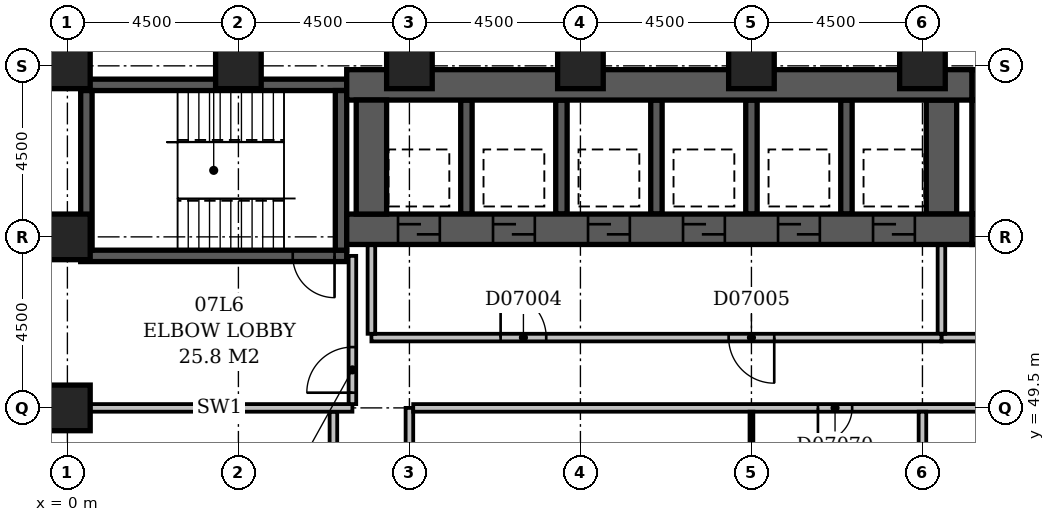
"""IFC4 building model, lengths in metres.
Left out: names, types, materials, properties, quantities, classifications, styles, units other than length and angle.
Written with IfcOpenShell. Run it as: python <this file> out.ifc"""

import sys

from ifc_helpers import new_model, si_unit, direction, frame, frame_2d, origin, origin_2d, place, context, subcontext, project, spatial, rectangle, extrude, element, fill, save


model = new_model("IFC4")
c1 = context("Model", 3, precision=1e-05, world=origin(), true_north=direction((0.0, 1.0)))
c2 = subcontext(c1, "Body", "Model", "MODEL_VIEW")
j1 = project(units=[si_unit("LENGTHUNIT", "METRE"), si_unit("PLANEANGLEUNIT", "RADIAN")], contexts=[c1])
p1 = place(None, origin())
s1 = spatial("IfcSite", under=j1, at=p1, CompositionType="ELEMENT")
p2 = place(p1, origin())
s2 = spatial("IfcBuilding", under=s1, at=p2, CompositionType="ELEMENT")
p3 = place(p2, frame((0.0, 0.0, 36.2)))
s3 = spatial("IfcBuildingStorey", under=s2, at=p3, CompositionType="ELEMENT", Elevation=36.2)
p4 = place(p3, frame((0.35, 53.5, -0.3), z_axis=(0.0, 0.0, 1.0), x_axis=(1.0, 0.0, 0.0)))
e1 = element("IfcWall", 1, at=p4, inside=s3, PredefinedType="SHEAR", context=c2, shape_type="SweptSolid", body=[
    extrude(rectangle(XDim=7.0, YDim=0.3, at=frame_2d((3.5, 0.0))), origin(), (0.0, 0.0, 1.0), 3.6),
])
p5 = place(p4, frame((5.58, 0.0, 0.3)))
e2 = element("IfcOpeningElement", 2, at=p5, cuts=e1, PredefinedType="OPENING", context=c2, shape_type="SweptSolid", body=[
    extrude(rectangle(XDim=1.1, YDim=2.1, at=frame_2d((0.55, 1.05))), frame((0.0, 0.162, 0.0), z_axis=(0.0, -1.0, 0.0), x_axis=(1.0, 0.0, 0.0)), (0.0, 0.0, 1.0), 0.324),
])
p6 = place(p3, frame((0.35, 58.0, -0.3), z_axis=(0.0, 0.0, 1.0), x_axis=(1.0, 0.0, 0.0)))
e3 = element("IfcWall", 3, at=p6, inside=s3, PredefinedType="SHEAR", context=c2, shape_type="SweptSolid", body=[
    extrude(rectangle(XDim=7.0, YDim=0.3, at=frame_2d((3.5, 0.0))), origin(), (0.0, 0.0, 1.0), 3.6),
])
for number, where, z_axis, x_axis in (
    (4, (0.5, 53.65, -0.3), (0.0, 0.0, 1.0), (0.0, 1.0, 0.0)),
    (5, (7.2, 53.65, -0.3), (0.0, 0.0, 1.0), (0.0, 1.0, 0.0)),
):
    element("IfcWall", number, at=place(p3, frame(where, z_axis=z_axis, x_axis=x_axis)), inside=s3, PredefinedType="SHEAR", context=c2, shape_type="SweptSolid", body=[
        extrude(rectangle(XDim=4.2, YDim=0.3, at=frame_2d((2.1, 0.0))), origin(), (0.0, 0.0, 1.0), 3.6),
    ])
p7 = place(p3, frame((7.35, 54.2, -0.3), z_axis=(0.0, 0.0, 1.0), x_axis=(1.0, 0.0, 0.0)))
e6 = element("IfcWall", 6, at=p7, inside=s3, PredefinedType="SHEAR", context=c2, shape_type="SweptSolid", body=[
    extrude(rectangle(XDim=16.45, YDim=0.8, at=frame_2d((8.225, 0.0))), origin(), (0.0, 0.0, 1.0), 3.6),
])
p8 = place(p7, frame((1.35, 0.0, 0.3)))
e7 = element("IfcOpeningElement", 7, at=p8, cuts=e6, PredefinedType="OPENING", context=c2, shape_type="SweptSolid", body=[
    extrude(rectangle(XDim=1.1, YDim=2.1, at=frame_2d((0.55, 1.05))), frame((0.0, 0.412, 0.0), z_axis=(0.0, -1.0, 0.0), x_axis=(1.0, 0.0, 0.0)), (0.0, 0.0, 1.0), 0.824),
])
p9 = place(p7, frame((3.85, 0.0, 0.3)))
e8 = element("IfcOpeningElement", 8, at=p9, cuts=e6, PredefinedType="OPENING", context=c2, shape_type="SweptSolid", body=[
    extrude(rectangle(XDim=1.1, YDim=2.1, at=frame_2d((0.55, 1.05))), frame((0.0, 0.412, 0.0), z_axis=(0.0, -1.0, 0.0), x_axis=(1.0, 0.0, 0.0)), (0.0, 0.0, 1.0), 0.824),
])
p10 = place(p7, frame((6.35, 0.0, 0.3)))
e9 = element("IfcOpeningElement", 9, at=p10, cuts=e6, PredefinedType="OPENING", context=c2, shape_type="SweptSolid", body=[
    extrude(rectangle(XDim=1.1, YDim=2.1, at=frame_2d((0.55, 1.05))), frame((0.0, 0.412, 0.0), z_axis=(0.0, -1.0, 0.0), x_axis=(1.0, 0.0, 0.0)), (0.0, 0.0, 1.0), 0.824),
])
p11 = place(p7, frame((8.85, 0.0, 0.3)))
e10 = element("IfcOpeningElement", 10, at=p11, cuts=e6, PredefinedType="OPENING", context=c2, shape_type="SweptSolid", body=[
    extrude(rectangle(XDim=1.1, YDim=2.1, at=frame_2d((0.55, 1.05))), frame((0.0, 0.412, 0.0), z_axis=(0.0, -1.0, 0.0), x_axis=(1.0, 0.0, 0.0)), (0.0, 0.0, 1.0), 0.824),
])
p12 = place(p7, frame((11.35, 0.0, 0.3)))
e11 = element("IfcOpeningElement", 11, at=p12, cuts=e6, PredefinedType="OPENING", context=c2, shape_type="SweptSolid", body=[
    extrude(rectangle(XDim=1.1, YDim=2.1, at=frame_2d((0.55, 1.05))), frame((0.0, 0.412, 0.0), z_axis=(0.0, -1.0, 0.0), x_axis=(1.0, 0.0, 0.0)), (0.0, 0.0, 1.0), 0.824),
])
p13 = place(p7, frame((13.85, 0.0, 0.3)))
e12 = element("IfcOpeningElement", 12, at=p13, cuts=e6, PredefinedType="OPENING", context=c2, shape_type="SweptSolid", body=[
    extrude(rectangle(XDim=1.1, YDim=2.1, at=frame_2d((0.55, 1.05))), frame((0.0, 0.412, 0.0), z_axis=(0.0, -1.0, 0.0), x_axis=(1.0, 0.0, 0.0)), (0.0, 0.0, 1.0), 0.824),
])
p14 = place(p3, frame((7.35, 58.0, -0.3), z_axis=(0.0, 0.0, 1.0), x_axis=(1.0, 0.0, 0.0)))
e13 = element("IfcWall", 13, at=p14, inside=s3, PredefinedType="SHEAR", context=c2, shape_type="SweptSolid", body=[
    extrude(rectangle(XDim=16.45, YDim=0.8, at=frame_2d((8.225, 0.0))), origin(), (0.0, 0.0, 1.0), 3.6),
])
p15 = place(p3, frame((8.0, 54.6, -0.3), z_axis=(0.0, 0.0, 1.0), x_axis=(0.0, 1.0, 0.0)))
e14 = element("IfcWall", 14, at=p15, inside=s3, PredefinedType="SHEAR", context=c2, shape_type="SweptSolid", body=[
    extrude(rectangle(XDim=3.0, YDim=0.8, at=frame_2d((1.5, 0.0))), origin(), (0.0, 0.0, 1.0), 3.6),
])
for number, where, z_axis, x_axis in (
    (15, (10.5, 54.6, -0.3), (0.0, 0.0, 1.0), (0.0, 1.0, 0.0)),
    (16, (13.0, 54.6, -0.3), (0.0, 0.0, 1.0), (0.0, 1.0, 0.0)),
    (17, (15.5, 54.6, -0.3), (0.0, 0.0, 1.0), (0.0, 1.0, 0.0)),
    (18, (18.0, 54.6, -0.3), (0.0, 0.0, 1.0), (0.0, 1.0, 0.0)),
    (19, (20.5, 54.6, -0.3), (0.0, 0.0, 1.0), (0.0, 1.0, 0.0)),
):
    element("IfcWall", number, at=place(p3, frame(where, z_axis=z_axis, x_axis=x_axis)), inside=s3, PredefinedType="SHEAR", context=c2, shape_type="SweptSolid", body=[
        extrude(rectangle(XDim=3.0, YDim=0.3, at=frame_2d((1.5, 0.0))), origin(), (0.0, 0.0, 1.0), 3.6),
    ])
p16 = place(p3, frame((23.0, 54.6, -0.3), z_axis=(0.0, 0.0, 1.0), x_axis=(0.0, 1.0, 0.0)))
e20 = element("IfcWall", 20, at=p16, inside=s3, PredefinedType="SHEAR", context=c2, shape_type="SweptSolid", body=[
    extrude(rectangle(XDim=3.0, YDim=0.8, at=frame_2d((1.5, 0.0))), origin(), (0.0, 0.0, 1.0), 3.6),
])
p17 = place(p3, frame((23.8, 54.2, -0.3), z_axis=(0.0, 0.0, 1.0), x_axis=(1.0, 0.0, 0.0)))
e21 = element("IfcWall", 21, at=p17, inside=s3, PredefinedType="SHEAR", context=c2, shape_type="SweptSolid", body=[
    extrude(rectangle(XDim=3.3, YDim=0.8, at=frame_2d((1.65, 0.0))), origin(), (0.0, 0.0, 1.0), 3.6),
])
p18 = place(p17, frame((1.1, 0.0, 0.3)))
e22 = element("IfcOpeningElement", 22, at=p18, cuts=e21, PredefinedType="OPENING", context=c2, shape_type="SweptSolid", body=[
    extrude(rectangle(XDim=1.1, YDim=2.1, at=frame_2d((0.55, 1.05))), frame((0.0, 0.412, 0.0), z_axis=(0.0, -1.0, 0.0), x_axis=(1.0, 0.0, 0.0)), (0.0, 0.0, 1.0), 0.824),
])
p19 = place(p3, frame((23.8, 58.0, -0.3), z_axis=(0.0, 0.0, 1.0), x_axis=(1.0, 0.0, 0.0)))
e23 = element("IfcWall", 23, at=p19, inside=s3, PredefinedType="SHEAR", context=c2, shape_type="SweptSolid", body=[
    extrude(rectangle(XDim=3.3, YDim=0.8, at=frame_2d((1.65, 0.0))), origin(), (0.0, 0.0, 1.0), 3.6),
])
p20 = place(p3, frame((24.2, 54.6, -0.3), z_axis=(0.0, 0.0, 1.0), x_axis=(0.0, 1.0, 0.0)))
e24 = element("IfcWall", 24, at=p20, inside=s3, PredefinedType="SHEAR", context=c2, shape_type="SweptSolid", body=[
    extrude(rectangle(XDim=3.0, YDim=0.8, at=frame_2d((1.5, 0.0))), origin(), (0.0, 0.0, 1.0), 3.6),
])
for number, where, z_axis, x_axis in (
    (25, (0.0, 49.5, -0.3), (0.0, 0.0, 1.0), (1.0, 0.0, 0.0)),
    (26, (0.0, 54.0, -0.3), (0.0, 0.0, 1.0), (1.0, 0.0, 0.0)),
    (27, (0.0, 58.5, -0.3), (0.0, 0.0, 1.0), (1.0, 0.0, 0.0)),
    (28, (4.5, 58.5, -0.3), (0.0, 0.0, 1.0), (1.0, 0.0, 0.0)),
    (29, (9.0, 58.5, -0.3), (0.0, 0.0, 1.0), (1.0, 0.0, 0.0)),
    (30, (13.5, 58.5, -0.3), (0.0, 0.0, 1.0), (1.0, 0.0, 0.0)),
    (31, (18.0, 58.5, -0.3), (0.0, 0.0, 1.0), (1.0, 0.0, 0.0)),
    (32, (22.5, 58.5, -0.3), (0.0, 0.0, 1.0), (1.0, 0.0, 0.0)),
):
    element("IfcColumn", number, at=place(p3, frame(where, z_axis=z_axis, x_axis=x_axis)), inside=s3, PredefinedType="COLUMN", context=c2, shape_type="SweptSolid", body=[
        extrude(rectangle(XDim=1.2, YDim=1.2, at=origin_2d()), origin(), (0.0, 0.0, 1.0), 3.6),
    ])
p21 = place(p3, frame((8.0, 51.35, 0.0), z_axis=(0.0, 0.0, 1.0), x_axis=(1.0, 0.0, 0.0)))
e33 = element("IfcWall", 33, at=p21, inside=s3, PredefinedType="PARTITIONING", context=c2, shape_type="SweptSolid", body=[
    extrude(rectangle(XDim=15.0, YDim=0.2, at=frame_2d((7.5, 0.0))), origin(), (0.0, 0.0, 1.0), 3.3),
])
p22 = place(p21, frame((3.4, 0.0, 0.0)))
e34 = element("IfcOpeningElement", 34, at=p22, cuts=e33, PredefinedType="OPENING", context=c2, shape_type="SweptSolid", body=[
    extrude(rectangle(XDim=1.2, YDim=2.1, at=frame_2d((0.6, 1.05))), frame((0.0, 0.112, 0.0), z_axis=(0.0, -1.0, 0.0), x_axis=(1.0, 0.0, 0.0)), (0.0, 0.0, 1.0), 0.224),
])
p23 = place(p21, frame((9.4, 0.0, 0.0)))
e35 = element("IfcOpeningElement", 35, at=p23, cuts=e33, PredefinedType="OPENING", context=c2, shape_type="SweptSolid", body=[
    extrude(rectangle(XDim=1.2, YDim=2.1, at=frame_2d((0.6, 1.05))), frame((0.0, 0.112, 0.0), z_axis=(0.0, -1.0, 0.0), x_axis=(1.0, 0.0, 0.0)), (0.0, 0.0, 1.0), 0.224),
])
for number, where, z_axis, x_axis in (
    (36, (23.0, 51.45, 0.0), (0.0, 0.0, 1.0), (0.0, 1.0, 0.0)),
    (37, (8.0, 51.45, 0.0), (0.0, 0.0, 1.0), (0.0, 1.0, 0.0)),
):
    element("IfcWall", number, at=place(p3, frame(where, z_axis=z_axis, x_axis=x_axis)), inside=s3, PredefinedType="PARTITIONING", context=c2, shape_type="SweptSolid", body=[
        extrude(rectangle(XDim=2.33, YDim=0.2, at=frame_2d((1.165, 0.0))), origin(), (0.0, 0.0, 1.0), 3.3),
    ])
p24 = place(p3, frame((23.0, 51.35, 0.0), z_axis=(0.0, 0.0, 1.0), x_axis=(1.0, 0.0, 0.0)))
e38 = element("IfcWall", 38, at=p24, inside=s3, PredefinedType="PARTITIONING", context=c2, shape_type="SweptSolid", body=[
    extrude(rectangle(XDim=4.8, YDim=0.2, at=frame_2d((2.4, 0.0))), origin(), (0.0, 0.0, 1.0), 3.3),
])
p25 = place(p24, frame((1.65, 0.0, 0.0)))
e39 = element("IfcOpeningElement", 39, at=p25, cuts=e38, PredefinedType="OPENING", context=c2, shape_type="SweptSolid", body=[
    extrude(rectangle(XDim=1.2, YDim=2.1, at=frame_2d((0.6, 1.05))), frame((0.0, 0.112, 0.0), z_axis=(0.0, -1.0, 0.0), x_axis=(1.0, 0.0, 0.0)), (0.0, 0.0, 1.0), 0.224),
])
p26 = place(p3, frame((0.5, 49.5, 0.0), z_axis=(0.0, 0.0, 1.0), x_axis=(1.0, 0.0, 0.0)))
e40 = element("IfcWall", 40, at=p26, inside=s3, PredefinedType="PARTITIONING", context=c2, shape_type="SweptSolid", body=[
    extrude(rectangle(XDim=7.0, YDim=0.2, at=frame_2d((3.5, 0.0))), origin(), (0.0, 0.0, 1.0), 3.3),
])
p27 = place(p3, frame((7.5, 49.6, 0.0), z_axis=(0.0, 0.0, 1.0), x_axis=(0.0, 1.0, 0.0)))
e41 = element("IfcWall", 41, at=p27, inside=s3, PredefinedType="PARTITIONING", context=c2, shape_type="SweptSolid", body=[
    extrude(rectangle(XDim=3.9, YDim=0.2, at=frame_2d((1.95, 0.0))), origin(), (0.0, 0.0, 1.0), 3.3),
])
p28 = place(p27, frame((0.3, 0.0, 0.0)))
e42 = element("IfcOpeningElement", 42, at=p28, cuts=e41, PredefinedType="OPENING", context=c2, shape_type="SweptSolid", body=[
    extrude(rectangle(XDim=1.2, YDim=2.1, at=frame_2d((0.6, 1.05))), frame((0.0, 0.112, 0.0), z_axis=(0.0, -1.0, 0.0), x_axis=(1.0, 0.0, 0.0)), (0.0, 0.0, 1.0), 0.224),
])
p29 = place(p3, frame((9.0, 5.0, 0.0), z_axis=(0.0, 0.0, 1.0), x_axis=(0.0, 1.0, 0.0)))
e43 = element("IfcWall", 43, at=p29, inside=s3, PredefinedType="PARTITIONING", context=c2, shape_type="SweptSolid", body=[
    extrude(rectangle(XDim=44.5, YDim=0.2, at=frame_2d((22.25, 0.0))), origin(), (0.0, 0.0, 1.0), 3.3),
])
p30 = place(p29, frame((24.7, 0.0, 0.0)))
e44 = element("IfcOpeningElement", 44, at=p30, cuts=e43, PredefinedType="OPENING", context=c2, shape_type="SweptSolid", body=[
    extrude(rectangle(XDim=1.0, YDim=2.1, at=frame_2d((0.5, 1.05))), frame((0.0, 0.112, 0.0), z_axis=(0.0, -1.0, 0.0), x_axis=(1.0, 0.0, 0.0)), (0.0, 0.0, 1.0), 0.224),
])
p31 = place(p29, frame((13.3, 0.0, 0.0)))
e45 = element("IfcOpeningElement", 45, at=p31, cuts=e43, PredefinedType="OPENING", context=c2, shape_type="SweptSolid", body=[
    extrude(rectangle(XDim=1.0, YDim=2.1, at=frame_2d((0.5, 1.05))), frame((0.0, 0.112, 0.0), z_axis=(0.0, -1.0, 0.0), x_axis=(1.0, 0.0, 0.0)), (0.0, 0.0, 1.0), 0.224),
])
p32 = place(p29, frame((10.45, 0.0, 0.0)))
e46 = element("IfcOpeningElement", 46, at=p32, cuts=e43, PredefinedType="OPENING", context=c2, shape_type="SweptSolid", body=[
    extrude(rectangle(XDim=1.0, YDim=2.1, at=frame_2d((0.5, 1.05))), frame((0.0, 0.112, 0.0), z_axis=(0.0, -1.0, 0.0), x_axis=(1.0, 0.0, 0.0)), (0.0, 0.0, 1.0), 0.224),
])
p33 = place(p29, frame((5.95, 0.0, 0.0)))
e47 = element("IfcOpeningElement", 47, at=p33, cuts=e43, PredefinedType="OPENING", context=c2, shape_type="SweptSolid", body=[
    extrude(rectangle(XDim=1.0, YDim=2.1, at=frame_2d((0.5, 1.05))), frame((0.0, 0.112, 0.0), z_axis=(0.0, -1.0, 0.0), x_axis=(1.0, 0.0, 0.0)), (0.0, 0.0, 1.0), 0.224),
])
p34 = place(p29, frame((37.25, 0.0, 0.0)))
e48 = element("IfcOpeningElement", 48, at=p34, cuts=e43, PredefinedType="OPENING", context=c2, shape_type="SweptSolid", body=[
    extrude(rectangle(XDim=0.9, YDim=2.1, at=frame_2d((0.45, 1.05))), frame((0.0, 0.112, 0.0), z_axis=(0.0, -1.0, 0.0), x_axis=(1.0, 0.0, 0.0)), (0.0, 0.0, 1.0), 0.224),
])
p35 = place(p29, frame((1.5, 0.0, 0.0)))
e49 = element("IfcOpeningElement", 49, at=p35, cuts=e43, PredefinedType="OPENING", context=c2, shape_type="SweptSolid", body=[
    extrude(rectangle(XDim=0.9, YDim=2.1, at=frame_2d((0.45, 1.05))), frame((0.0, 0.112, 0.0), z_axis=(0.0, -1.0, 0.0), x_axis=(1.0, 0.0, 0.0)), (0.0, 0.0, 1.0), 0.224),
])
p36 = place(p3, frame((7.0, 34.6, 0.0), z_axis=(0.0, 0.0, 1.0), x_axis=(0.0, 1.0, 0.0)))
e50 = element("IfcWall", 50, at=p36, inside=s3, PredefinedType="PARTITIONING", context=c2, shape_type="SweptSolid", body=[
    extrude(rectangle(XDim=14.8, YDim=0.2, at=frame_2d((7.4, 0.0))), origin(), (0.0, 0.0, 1.0), 3.3),
])
p37 = place(p36, frame((6.95, 0.0, 0.0)))
e51 = element("IfcOpeningElement", 51, at=p37, cuts=e50, PredefinedType="OPENING", context=c2, shape_type="SweptSolid", body=[
    extrude(rectangle(XDim=0.9, YDim=2.1, at=frame_2d((0.45, 1.05))), frame((0.0, 0.112, 0.0), z_axis=(0.0, -1.0, 0.0), x_axis=(1.0, 0.0, 0.0)), (0.0, 0.0, 1.0), 0.224),
])
p38 = place(p3, frame((18.0, 36.1, 0.0), z_axis=(0.0, 0.0, 1.0), x_axis=(0.0, 1.0, 0.0)))
e52 = element("IfcWall", 52, at=p38, inside=s3, PredefinedType="PARTITIONING", context=c2, shape_type="SweptSolid", body=[
    extrude(rectangle(XDim=13.3, YDim=0.1, at=frame_2d((6.65, 0.0))), origin(), (0.0, 0.0, 1.0), 3.3),
])
p39 = place(p3, frame((22.5, 36.6, 0.0), z_axis=(0.0, 0.0, 1.0), x_axis=(0.0, 1.0, 0.0)))
e53 = element("IfcWall", 53, at=p39, inside=s3, PredefinedType="PARTITIONING", context=c2, shape_type="SweptSolid", body=[
    extrude(rectangle(XDim=12.8, YDim=0.2, at=frame_2d((6.4, 0.0))), origin(), (0.0, 0.0, 1.0), 3.3),
])
p40 = place(p3, frame((9.1, 49.5, 0.0), z_axis=(0.0, 0.0, 1.0), x_axis=(1.0, 0.0, 0.0)))
e54 = element("IfcWall", 54, at=p40, inside=s3, PredefinedType="PARTITIONING", context=c2, shape_type="SweptSolid", body=[
    extrude(rectangle(XDim=57.8, YDim=0.2, at=frame_2d((28.9, 0.0))), origin(), (0.0, 0.0, 1.0), 3.3),
])
p41 = place(p40, frame((20.6, 0.0, 0.0)))
e55 = element("IfcOpeningElement", 55, at=p41, cuts=e54, PredefinedType="OPENING", context=c2, shape_type="SweptSolid", body=[
    extrude(rectangle(XDim=1.0, YDim=2.1, at=frame_2d((0.5, 1.05))), frame((0.0, 0.112, 0.0), z_axis=(0.0, -1.0, 0.0), x_axis=(1.0, 0.0, 0.0)), (0.0, 0.0, 1.0), 0.224),
])
p42 = place(p40, frame((31.7, 0.0, 0.0)))
e56 = element("IfcOpeningElement", 56, at=p42, cuts=e54, PredefinedType="OPENING", context=c2, shape_type="SweptSolid", body=[
    extrude(rectangle(XDim=1.0, YDim=2.1, at=frame_2d((0.5, 1.05))), frame((0.0, 0.112, 0.0), z_axis=(0.0, -1.0, 0.0), x_axis=(1.0, 0.0, 0.0)), (0.0, 0.0, 1.0), 0.224),
])
p43 = place(p40, frame((47.6, 0.0, 0.0)))
e57 = element("IfcOpeningElement", 57, at=p43, cuts=e54, PredefinedType="OPENING", context=c2, shape_type="SweptSolid", body=[
    extrude(rectangle(XDim=1.0, YDim=2.1, at=frame_2d((0.5, 1.05))), frame((0.0, 0.112, 0.0), z_axis=(0.0, -1.0, 0.0), x_axis=(1.0, 0.0, 0.0)), (0.0, 0.0, 1.0), 0.224),
])
p44 = place(p40, frame((54.15, 0.0, 0.0)))
e58 = element("IfcOpeningElement", 58, at=p44, cuts=e54, PredefinedType="OPENING", context=c2, shape_type="SweptSolid", body=[
    extrude(rectangle(XDim=1.0, YDim=2.1, at=frame_2d((0.5, 1.05))), frame((0.0, 0.112, 0.0), z_axis=(0.0, -1.0, 0.0), x_axis=(1.0, 0.0, 0.0)), (0.0, 0.0, 1.0), 0.224),
])
p45 = place(p40, frame((10.65, 0.0, 0.0)))
e59 = element("IfcOpeningElement", 59, at=p45, cuts=e54, PredefinedType="OPENING", context=c2, shape_type="SweptSolid", body=[
    extrude(rectangle(XDim=0.9, YDim=2.1, at=frame_2d((0.45, 1.05))), frame((0.0, 0.112, 0.0), z_axis=(0.0, -1.0, 0.0), x_axis=(1.0, 0.0, 0.0)), (0.0, 0.0, 1.0), 0.224),
])
p46 = place(p28, origin())
e60 = element("IfcDoor", 60, at=p46, inside=s3, OperationType="SINGLE_SWING_LEFT", PredefinedType="DOOR", context=c2, shape_type="SweptSolid", body=[
    extrude(rectangle(XDim=1.2, YDim=2.1, at=frame_2d((0.6, 1.05))), frame((0.0, 0.025, 0.0), z_axis=(0.0, -1.0, 0.0), x_axis=(1.0, 0.0, 0.0)), (0.0, 0.0, 1.0), 0.05),
])
fill(e42, e60)
p47 = place(p8, origin())
e61 = element("IfcDoor", 61, at=p47, inside=s3, OperationType="SLIDING_TO_LEFT", PredefinedType="DOOR", context=c2, shape_type="SweptSolid", body=[
    extrude(rectangle(XDim=1.1, YDim=2.1, at=frame_2d((0.55, 1.05))), frame((0.0, 0.025, 0.0), z_axis=(0.0, -1.0, 0.0), x_axis=(1.0, 0.0, 0.0)), (0.0, 0.0, 1.0), 0.05),
])
fill(e7, e61)
p48 = place(p9, origin())
e62 = element("IfcDoor", 62, at=p48, inside=s3, OperationType="SLIDING_TO_LEFT", PredefinedType="DOOR", context=c2, shape_type="SweptSolid", body=[
    extrude(rectangle(XDim=1.1, YDim=2.1, at=frame_2d((0.55, 1.05))), frame((0.0, 0.025, 0.0), z_axis=(0.0, -1.0, 0.0), x_axis=(1.0, 0.0, 0.0)), (0.0, 0.0, 1.0), 0.05),
])
fill(e8, e62)
p49 = place(p10, origin())
e63 = element("IfcDoor", 63, at=p49, inside=s3, OperationType="SLIDING_TO_LEFT", PredefinedType="DOOR", context=c2, shape_type="SweptSolid", body=[
    extrude(rectangle(XDim=1.1, YDim=2.1, at=frame_2d((0.55, 1.05))), frame((0.0, 0.025, 0.0), z_axis=(0.0, -1.0, 0.0), x_axis=(1.0, 0.0, 0.0)), (0.0, 0.0, 1.0), 0.05),
])
fill(e9, e63)
p50 = place(p11, origin())
e64 = element("IfcDoor", 64, at=p50, inside=s3, OperationType="SLIDING_TO_LEFT", PredefinedType="DOOR", context=c2, shape_type="SweptSolid", body=[
    extrude(rectangle(XDim=1.1, YDim=2.1, at=frame_2d((0.55, 1.05))), frame((0.0, 0.025, 0.0), z_axis=(0.0, -1.0, 0.0), x_axis=(1.0, 0.0, 0.0)), (0.0, 0.0, 1.0), 0.05),
])
fill(e10, e64)
p51 = place(p12, origin())
e65 = element("IfcDoor", 65, at=p51, inside=s3, OperationType="SLIDING_TO_LEFT", PredefinedType="DOOR", context=c2, shape_type="SweptSolid", body=[
    extrude(rectangle(XDim=1.1, YDim=2.1, at=frame_2d((0.55, 1.05))), frame((0.0, 0.025, 0.0), z_axis=(0.0, -1.0, 0.0), x_axis=(1.0, 0.0, 0.0)), (0.0, 0.0, 1.0), 0.05),
])
fill(e11, e65)
p52 = place(p13, origin())
e66 = element("IfcDoor", 66, at=p52, inside=s3, OperationType="SLIDING_TO_LEFT", PredefinedType="DOOR", context=c2, shape_type="SweptSolid", body=[
    extrude(rectangle(XDim=1.1, YDim=2.1, at=frame_2d((0.55, 1.05))), frame((0.0, 0.025, 0.0), z_axis=(0.0, -1.0, 0.0), x_axis=(1.0, 0.0, 0.0)), (0.0, 0.0, 1.0), 0.05),
])
fill(e12, e66)
p53 = place(p22, origin())
e67 = element("IfcDoor", 67, at=p53, inside=s3, OperationType="SINGLE_SWING_LEFT", PredefinedType="DOOR", context=c2, shape_type="SweptSolid", body=[
    extrude(rectangle(XDim=1.2, YDim=2.1, at=frame_2d((0.6, 1.05))), frame((0.0, 0.025, 0.0), z_axis=(0.0, -1.0, 0.0), x_axis=(1.0, 0.0, 0.0)), (0.0, 0.0, 1.0), 0.05),
])
fill(e34, e67)
p54 = place(p23, origin())
e68 = element("IfcDoor", 68, at=p54, inside=s3, OperationType="SINGLE_SWING_RIGHT", PredefinedType="DOOR", context=c2, shape_type="SweptSolid", body=[
    extrude(rectangle(XDim=1.2, YDim=2.1, at=frame_2d((0.6, 1.05))), frame((0.0, 0.025, 0.0), z_axis=(0.0, -1.0, 0.0), x_axis=(1.0, 0.0, 0.0)), (0.0, 0.0, 1.0), 0.05),
])
fill(e35, e68)
p55 = place(p5, origin())
e69 = element("IfcDoor", 69, at=p55, inside=s3, OperationType="SINGLE_SWING_RIGHT", PredefinedType="DOOR", context=c2, shape_type="SweptSolid", body=[
    extrude(rectangle(XDim=1.1, YDim=2.1, at=frame_2d((0.55, 1.05))), frame((0.0, 0.025, 0.0), z_axis=(0.0, -1.0, 0.0), x_axis=(1.0, 0.0, 0.0)), (0.0, 0.0, 1.0), 0.05),
])
fill(e2, e69)
p56 = place(p45, frame((0.9, 0.0, 0.0), z_axis=(0.0, 0.0, 1.0), x_axis=(-1.0, 0.0, 0.0)))
e70 = element("IfcDoor", 70, at=p56, inside=s3, OperationType="SINGLE_SWING_RIGHT", PredefinedType="DOOR", context=c2, shape_type="SweptSolid", body=[
    extrude(rectangle(XDim=0.9, YDim=2.1, at=frame_2d((0.45, 1.05))), frame((0.0, 0.025, 0.0), z_axis=(0.0, -1.0, 0.0), x_axis=(1.0, 0.0, 0.0)), (0.0, 0.0, 1.0), 0.05),
])
fill(e59, e70)
save(model, sys.argv[1])
